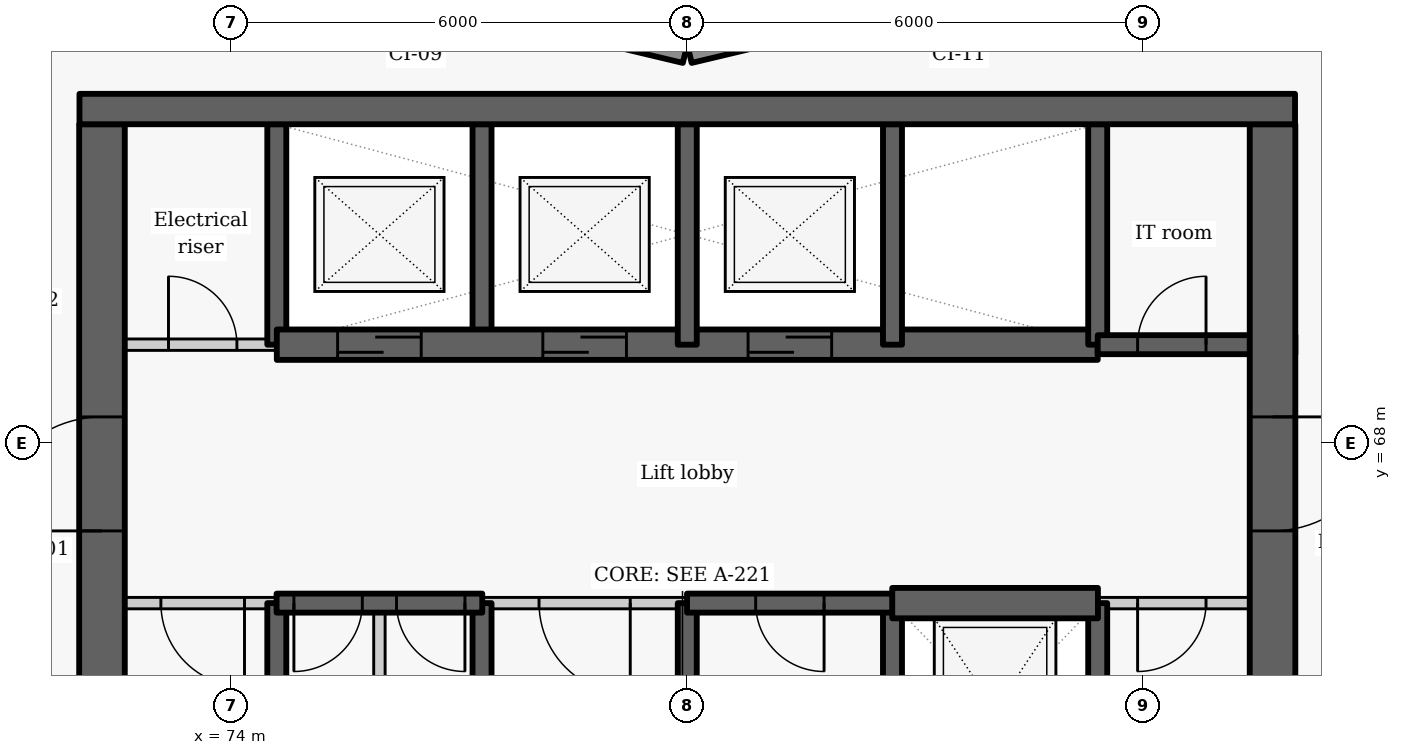
"""IFC4 building model, lengths in metres.
Left out: names, types, materials, properties, quantities, classifications, styles, units other than length and angle.
Written with IfcOpenShell. Run it as: python <this file> out.ifc"""

import sys

from ifc_helpers import new_model, si_unit, direction, frame, frame_2d, origin, place, context, subcontext, project, spatial, rectangle, extrude, element, fill, save


model = new_model("IFC4")
c1 = context("Model", 3, precision=1e-05, world=origin(), true_north=direction((0.0, 1.0)))
c2 = subcontext(c1, "Body", "Model", "MODEL_VIEW")
j1 = project(units=[si_unit("LENGTHUNIT", "METRE"), si_unit("PLANEANGLEUNIT", "RADIAN")], contexts=[c1])
p1 = place(None, origin())
s1 = spatial("IfcSite", under=j1, at=p1, CompositionType="ELEMENT")
p2 = place(p1, origin())
s2 = spatial("IfcBuilding", under=s1, at=p2, CompositionType="ELEMENT")
p3 = place(p2, frame((0.0, 0.0, 114.0)))
s3 = spatial("IfcBuildingStorey", under=s2, at=p3, CompositionType="ELEMENT", Elevation=114.0)
for number, where, z_axis, x_axis in (
    (1, (83.186, 73.881, 0.0), (0.0, 0.0, 1.0), (-0.973, -0.232, 0.0)),
    (2, (79.971, 73.128, 0.0), (0.0, 0.0, 1.0), (-0.973, 0.232, 0.0)),
):
    element("IfcWall", number, at=place(p3, frame(where, z_axis=z_axis, x_axis=x_axis)), inside=s3, PredefinedType="SOLIDWALL", context=c2, shape_type="SweptSolid", body=[
        extrude(rectangle(XDim=3.246, YDim=0.25, at=frame_2d((1.623, 0.0))), origin(), (0.0, 0.0, 1.0), 2.425),
    ])
p4 = place(p3, frame((74.6, 63.1, -0.275), z_axis=(0.0, 0.0, 1.0), x_axis=(0.0, 1.0, 0.0)))
e3 = element("IfcWall", 3, at=p4, inside=s3, PredefinedType="SHEAR", context=c2, shape_type="SweptSolid", body=[
    extrude(rectangle(XDim=2.8, YDim=0.25, at=frame_2d((1.4, 0.0))), origin(), (0.0, 0.0, 1.0), 3.3),
])
p5 = place(p3, frame((74.6, 69.3, -0.275), z_axis=(0.0, 0.0, 1.0), x_axis=(0.0, 1.0, 0.0)))
e4 = element("IfcWall", 4, at=p5, inside=s3, PredefinedType="SHEAR", context=c2, shape_type="SweptSolid", body=[
    extrude(rectangle(XDim=2.9, YDim=0.25, at=frame_2d((1.45, 0.0))), origin(), (0.0, 0.0, 1.0), 3.3),
])
p6 = place(p3, frame((72.0, 69.3, 0.0), z_axis=(0.0, 0.0, 1.0), x_axis=(1.0, 0.0, 0.0)))
e5 = element("IfcWall", 5, at=p6, inside=s3, PredefinedType="PARTITIONING", context=c2, shape_type="SweptSolid", body=[
    extrude(rectangle(XDim=2.6, YDim=0.15, at=frame_2d((1.3, 0.0))), origin(), (0.0, 0.0, 1.0), 3.025),
])
p7 = place(p6, frame((1.175, 0.0, 0.0)))
e6 = element("IfcOpeningElement", 6, at=p7, cuts=e5, PredefinedType="OPENING", context=c2, shape_type="SweptSolid", body=[
    extrude(rectangle(XDim=0.9, YDim=2.1, at=frame_2d((0.45, 1.05))), frame((0.0, 0.085, 0.0), z_axis=(0.0, -1.0, 0.0), x_axis=(1.0, 0.0, 0.0)), (0.0, 0.0, 1.0), 0.17),
])
p8 = place(p3, frame((72.3, 63.1, -0.275), z_axis=(0.0, 0.0, 1.0), x_axis=(0.0, 1.0, 0.0)))
e7 = element("IfcWall", 7, at=p8, inside=s3, PredefinedType="SHEAR", context=c2, shape_type="SweptSolid", body=[
    extrude(rectangle(XDim=9.1, YDim=0.6, at=frame_2d((4.55, 0.0))), origin(), (0.0, 0.0, 1.0), 3.3),
])
p9 = place(p8, frame((3.75, 0.0, 0.275)))
e8 = element("IfcOpeningElement", 8, at=p9, cuts=e7, PredefinedType="OPENING", context=c2, shape_type="SweptSolid", body=[
    extrude(rectangle(XDim=1.5, YDim=2.1, at=frame_2d((0.75, 1.05))), frame((0.0, 0.31, 0.0), z_axis=(0.0, -1.0, 0.0), x_axis=(1.0, 0.0, 0.0)), (0.0, 0.0, 1.0), 0.62),
])
p10 = place(p3, frame((77.3, 63.1, -0.275), z_axis=(0.0, 0.0, 1.0), x_axis=(0.0, 1.0, 0.0)))
e9 = element("IfcWall", 9, at=p10, inside=s3, PredefinedType="SHEAR", context=c2, shape_type="SweptSolid", body=[
    extrude(rectangle(XDim=2.8, YDim=0.25, at=frame_2d((1.4, 0.0))), origin(), (0.0, 0.0, 1.0), 3.3),
])
p11 = place(p3, frame((77.3, 69.3, -0.275), z_axis=(0.0, 0.0, 1.0), x_axis=(0.0, 1.0, 0.0)))
e10 = element("IfcWall", 10, at=p11, inside=s3, PredefinedType="SHEAR", context=c2, shape_type="SweptSolid", body=[
    extrude(rectangle(XDim=2.9, YDim=0.25, at=frame_2d((1.45, 0.0))), origin(), (0.0, 0.0, 1.0), 3.3),
])
p12 = place(p3, frame((74.6, 69.3, -0.275), z_axis=(0.0, 0.0, 1.0), x_axis=(1.0, 0.0, 0.0)))
e11 = element("IfcWall", 11, at=p12, inside=s3, PredefinedType="SHEAR", context=c2, shape_type="SweptSolid", body=[
    extrude(rectangle(XDim=10.8, YDim=0.4, at=frame_2d((5.4, 0.0))), origin(), (0.0, 0.0, 1.0), 3.3),
])
p13 = place(p12, frame((0.8, 0.0, 0.275)))
e12 = element("IfcOpeningElement", 12, at=p13, cuts=e11, PredefinedType="OPENING", context=c2, shape_type="SweptSolid", body=[
    extrude(rectangle(XDim=1.1, YDim=2.1, at=frame_2d((0.55, 1.05))), frame((0.0, 0.21, 0.0), z_axis=(0.0, -1.0, 0.0), x_axis=(1.0, 0.0, 0.0)), (0.0, 0.0, 1.0), 0.42),
])
p14 = place(p12, frame((3.5, 0.0, 0.275)))
e13 = element("IfcOpeningElement", 13, at=p14, cuts=e11, PredefinedType="OPENING", context=c2, shape_type="SweptSolid", body=[
    extrude(rectangle(XDim=1.1, YDim=2.1, at=frame_2d((0.55, 1.05))), frame((0.0, 0.21, 0.0), z_axis=(0.0, -1.0, 0.0), x_axis=(1.0, 0.0, 0.0)), (0.0, 0.0, 1.0), 0.42),
])
p15 = place(p12, frame((6.2, 0.0, 0.275)))
e14 = element("IfcOpeningElement", 14, at=p15, cuts=e11, PredefinedType="OPENING", context=c2, shape_type="SweptSolid", body=[
    extrude(rectangle(XDim=1.1, YDim=2.1, at=frame_2d((0.55, 1.05))), frame((0.0, 0.21, 0.0), z_axis=(0.0, -1.0, 0.0), x_axis=(1.0, 0.0, 0.0)), (0.0, 0.0, 1.0), 0.42),
])
p16 = place(p3, frame((80.0, 63.1, -0.275), z_axis=(0.0, 0.0, 1.0), x_axis=(0.0, 1.0, 0.0)))
e15 = element("IfcWall", 15, at=p16, inside=s3, PredefinedType="SHEAR", context=c2, shape_type="SweptSolid", body=[
    extrude(rectangle(XDim=2.8, YDim=0.25, at=frame_2d((1.4, 0.0))), origin(), (0.0, 0.0, 1.0), 3.3),
])
p17 = place(p3, frame((80.0, 69.3, -0.275), z_axis=(0.0, 0.0, 1.0), x_axis=(0.0, 1.0, 0.0)))
e16 = element("IfcWall", 16, at=p17, inside=s3, PredefinedType="SHEAR", context=c2, shape_type="SweptSolid", body=[
    extrude(rectangle(XDim=2.9, YDim=0.25, at=frame_2d((1.45, 0.0))), origin(), (0.0, 0.0, 1.0), 3.3),
])
p18 = place(p3, frame((82.7, 63.1, -0.275), z_axis=(0.0, 0.0, 1.0), x_axis=(0.0, 1.0, 0.0)))
e17 = element("IfcWall", 17, at=p18, inside=s3, PredefinedType="SHEAR", context=c2, shape_type="SweptSolid", body=[
    extrude(rectangle(XDim=2.8, YDim=0.25, at=frame_2d((1.4, 0.0))), origin(), (0.0, 0.0, 1.0), 3.3),
])
p19 = place(p3, frame((82.7, 69.3, -0.275), z_axis=(0.0, 0.0, 1.0), x_axis=(0.0, 1.0, 0.0)))
e18 = element("IfcWall", 18, at=p19, inside=s3, PredefinedType="SHEAR", context=c2, shape_type="SweptSolid", body=[
    extrude(rectangle(XDim=2.9, YDim=0.25, at=frame_2d((1.45, 0.0))), origin(), (0.0, 0.0, 1.0), 3.3),
])
p20 = place(p3, frame((85.4, 63.1, -0.275), z_axis=(0.0, 0.0, 1.0), x_axis=(0.0, 1.0, 0.0)))
e19 = element("IfcWall", 19, at=p20, inside=s3, PredefinedType="SHEAR", context=c2, shape_type="SweptSolid", body=[
    extrude(rectangle(XDim=2.8, YDim=0.25, at=frame_2d((1.4, 0.0))), origin(), (0.0, 0.0, 1.0), 3.3),
])
p21 = place(p3, frame((85.4, 69.3, -0.275), z_axis=(0.0, 0.0, 1.0), x_axis=(0.0, 1.0, 0.0)))
e20 = element("IfcWall", 20, at=p21, inside=s3, PredefinedType="SHEAR", context=c2, shape_type="SweptSolid", body=[
    extrude(rectangle(XDim=2.9, YDim=0.25, at=frame_2d((1.45, 0.0))), origin(), (0.0, 0.0, 1.0), 3.3),
])
p22 = place(p3, frame((85.4, 69.3, -0.275), z_axis=(0.0, 0.0, 1.0), x_axis=(1.0, 0.0, 0.0)))
e21 = element("IfcWall", 21, at=p22, inside=s3, PredefinedType="SHEAR", context=c2, shape_type="SweptSolid", body=[
    extrude(rectangle(XDim=2.6, YDim=0.25, at=frame_2d((1.3, 0.0))), origin(), (0.0, 0.0, 1.0), 3.3),
])
p23 = place(p22, frame((0.525, 0.0, 0.275)))
e22 = element("IfcOpeningElement", 22, at=p23, cuts=e21, PredefinedType="OPENING", context=c2, shape_type="SweptSolid", body=[
    extrude(rectangle(XDim=0.9, YDim=2.1, at=frame_2d((0.45, 1.05))), frame((0.0, 0.135, 0.0), z_axis=(0.0, -1.0, 0.0), x_axis=(1.0, 0.0, 0.0)), (0.0, 0.0, 1.0), 0.27),
])
p24 = place(p3, frame((87.7, 72.2, -0.275), z_axis=(0.0, 0.0, 1.0), x_axis=(0.0, -1.0, 0.0)))
e23 = element("IfcWall", 23, at=p24, inside=s3, PredefinedType="SHEAR", context=c2, shape_type="SweptSolid", body=[
    extrude(rectangle(XDim=15.6, YDim=0.6, at=frame_2d((7.8, 0.0))), origin(), (0.0, 0.0, 1.0), 3.3),
])
p25 = place(p24, frame((3.85, 0.0, 0.275)))
e24 = element("IfcOpeningElement", 24, at=p25, cuts=e23, PredefinedType="OPENING", context=c2, shape_type="SweptSolid", body=[
    extrude(rectangle(XDim=1.5, YDim=2.1, at=frame_2d((0.75, 1.05))), frame((0.0, 0.31, 0.0), z_axis=(0.0, -1.0, 0.0), x_axis=(1.0, 0.0, 0.0)), (0.0, 0.0, 1.0), 0.62),
])
p26 = place(p24, frame((11.8, 0.0, 0.275)))
e25 = element("IfcOpeningElement", 25, at=p26, cuts=e23, PredefinedType="OPENING", context=c2, shape_type="SweptSolid", body=[
    extrude(rectangle(XDim=1.1, YDim=2.1, at=frame_2d((0.55, 1.05))), frame((0.0, 0.31, 0.0), z_axis=(0.0, -1.0, 0.0), x_axis=(1.0, 0.0, 0.0)), (0.0, 0.0, 1.0), 0.62),
])
p27 = place(p3, frame((74.603, 65.9, 0.0), z_axis=(0.0, 0.0, 1.0), x_axis=(-1.0, 0.0, 0.0)))
e26 = element("IfcWall", 26, at=p27, inside=s3, PredefinedType="PARTITIONING", context=c2, shape_type="SweptSolid", body=[
    extrude(rectangle(XDim=2.603, YDim=0.15, at=frame_2d((1.302, 0.0))), origin(), (0.0, 0.0, 1.0), 3.025),
])
p28 = place(p27, frame((0.428, 0.0, 0.0)))
e27 = element("IfcOpeningElement", 27, at=p28, cuts=e26, PredefinedType="OPENING", context=c2, shape_type="SweptSolid", body=[
    extrude(rectangle(XDim=1.1, YDim=2.1, at=frame_2d((0.55, 1.05))), frame((0.0, 0.085, 0.0), z_axis=(0.0, -1.0, 0.0), x_axis=(1.0, 0.0, 0.0)), (0.0, 0.0, 1.0), 0.17),
])
p29 = place(p3, frame((80.003, 65.9, 0.0), z_axis=(0.0, 0.0, 1.0), x_axis=(-1.0, 0.0, 0.0)))
e28 = element("IfcWall", 28, at=p29, inside=s3, PredefinedType="PARTITIONING", context=c2, shape_type="SweptSolid", body=[
    extrude(rectangle(XDim=2.706, YDim=0.15, at=frame_2d((1.353, 0.0))), origin(), (0.0, 0.0, 1.0), 3.025),
])
p30 = place(p29, frame((0.753, 0.0, 0.0)))
e29 = element("IfcOpeningElement", 29, at=p30, cuts=e28, PredefinedType="OPENING", context=c2, shape_type="SweptSolid", body=[
    extrude(rectangle(XDim=1.2, YDim=2.1, at=frame_2d((0.6, 1.05))), frame((0.0, 0.085, 0.0), z_axis=(0.0, -1.0, 0.0), x_axis=(1.0, 0.0, 0.0)), (0.0, 0.0, 1.0), 0.17),
])
p31 = place(p3, frame((88.0, 65.9, 0.0), z_axis=(0.0, 0.0, 1.0), x_axis=(-1.0, 0.0, 0.0)))
e30 = element("IfcWall", 30, at=p31, inside=s3, PredefinedType="PARTITIONING", context=c2, shape_type="SweptSolid", body=[
    extrude(rectangle(XDim=2.603, YDim=0.15, at=frame_2d((1.302, 0.0))), origin(), (0.0, 0.0, 1.0), 3.025),
])
p32 = place(p31, frame((1.175, 0.0, 0.0)))
e31 = element("IfcOpeningElement", 31, at=p32, cuts=e30, PredefinedType="OPENING", context=c2, shape_type="SweptSolid", body=[
    extrude(rectangle(XDim=0.9, YDim=2.1, at=frame_2d((0.45, 1.05))), frame((0.0, 0.085, 0.0), z_axis=(0.0, -1.0, 0.0), x_axis=(1.0, 0.0, 0.0)), (0.0, 0.0, 1.0), 0.17),
])
p33 = place(p3, frame((77.303, 65.9, -0.275), z_axis=(0.0, 0.0, 1.0), x_axis=(-1.0, 0.0, 0.0)))
e32 = element("IfcWall", 32, at=p33, inside=s3, PredefinedType="SHEAR", context=c2, shape_type="SweptSolid", body=[
    extrude(rectangle(XDim=2.706, YDim=0.25, at=frame_2d((1.353, 0.0))), origin(), (0.0, 0.0, 1.0), 3.3),
])
p34 = place(p33, frame((1.578, 0.0, 0.275)))
e33 = element("IfcOpeningElement", 33, at=p34, cuts=e32, PredefinedType="OPENING", context=c2, shape_type="SweptSolid", body=[
    extrude(rectangle(XDim=0.9, YDim=2.1, at=frame_2d((0.45, 1.05))), frame((0.0, 0.135, 0.0), z_axis=(0.0, -1.0, 0.0), x_axis=(1.0, 0.0, 0.0)), (0.0, 0.0, 1.0), 0.27),
])
p35 = place(p33, frame((0.228, 0.0, 0.275)))
e34 = element("IfcOpeningElement", 34, at=p35, cuts=e32, PredefinedType="OPENING", context=c2, shape_type="SweptSolid", body=[
    extrude(rectangle(XDim=0.9, YDim=2.1, at=frame_2d((0.45, 1.05))), frame((0.0, 0.135, 0.0), z_axis=(0.0, -1.0, 0.0), x_axis=(1.0, 0.0, 0.0)), (0.0, 0.0, 1.0), 0.27),
])
p36 = place(p3, frame((82.703, 65.9, -0.275), z_axis=(0.0, 0.0, 1.0), x_axis=(-1.0, 0.0, 0.0)))
e35 = element("IfcWall", 35, at=p36, inside=s3, PredefinedType="SHEAR", context=c2, shape_type="SweptSolid", body=[
    extrude(rectangle(XDim=2.706, YDim=0.25, at=frame_2d((1.353, 0.0))), origin(), (0.0, 0.0, 1.0), 3.3),
])
p37 = place(p36, frame((0.903, 0.0, 0.275)))
e36 = element("IfcOpeningElement", 36, at=p37, cuts=e35, PredefinedType="OPENING", context=c2, shape_type="SweptSolid", body=[
    extrude(rectangle(XDim=0.9, YDim=2.1, at=frame_2d((0.45, 1.05))), frame((0.0, 0.135, 0.0), z_axis=(0.0, -1.0, 0.0), x_axis=(1.0, 0.0, 0.0)), (0.0, 0.0, 1.0), 0.27),
])
p38 = place(p3, frame((82.697, 65.9, -0.275), z_axis=(0.0, 0.0, 1.0), x_axis=(1.0, 0.0, 0.0)))
e37 = element("IfcWall", 37, at=p38, inside=s3, PredefinedType="SHEAR", context=c2, shape_type="SweptSolid", body=[
    extrude(rectangle(XDim=2.706, YDim=0.4, at=frame_2d((1.353, 0.0))), origin(), (0.0, 0.0, 1.0), 3.3),
])
p39 = place(p3, frame((75.95, 63.1, 0.0), z_axis=(0.0, 0.0, 1.0), x_axis=(0.0, 1.0, 0.0)))
e38 = element("IfcWall", 38, at=p39, inside=s3, PredefinedType="PARTITIONING", context=c2, shape_type="SweptSolid", body=[
    extrude(rectangle(XDim=2.8, YDim=0.15, at=frame_2d((1.4, 0.0))), origin(), (0.0, 0.0, 1.0), 3.025),
])
p40 = place(p3, frame((72.004, 72.4, -0.275), z_axis=(0.0, 0.0, 1.0), x_axis=(1.0, 0.0, 0.0)))
e39 = element("IfcWall", 39, at=p40, inside=s3, PredefinedType="SHEAR", context=c2, shape_type="SweptSolid", body=[
    extrude(rectangle(XDim=15.992, YDim=0.4, at=frame_2d((7.996, 0.0))), origin(), (0.0, 0.0, 1.0), 3.3),
])
p41 = place(p7, origin())
e40 = element("IfcDoor", 40, at=p41, inside=s3, OperationType="SINGLE_SWING_LEFT", PredefinedType="DOOR", context=c2, shape_type="SweptSolid", body=[
    extrude(rectangle(XDim=0.9, YDim=2.1, at=frame_2d((0.45, 1.05))), frame((0.0, 0.025, 0.0), z_axis=(0.0, -1.0, 0.0), x_axis=(1.0, 0.0, 0.0)), (0.0, 0.0, 1.0), 0.05),
])
fill(e6, e40)
p42 = place(p13, origin())
e41 = element("IfcDoor", 41, at=p42, inside=s3, OperationType="SLIDING_TO_LEFT", PredefinedType="DOOR", context=c2, shape_type="SweptSolid", body=[
    extrude(rectangle(XDim=1.1, YDim=2.1, at=frame_2d((0.55, 1.05))), frame((0.0, 0.025, 0.0), z_axis=(0.0, -1.0, 0.0), x_axis=(1.0, 0.0, 0.0)), (0.0, 0.0, 1.0), 0.05),
])
fill(e12, e41)
p43 = place(p14, origin())
e42 = element("IfcDoor", 42, at=p43, inside=s3, OperationType="SLIDING_TO_LEFT", PredefinedType="DOOR", context=c2, shape_type="SweptSolid", body=[
    extrude(rectangle(XDim=1.1, YDim=2.1, at=frame_2d((0.55, 1.05))), frame((0.0, 0.025, 0.0), z_axis=(0.0, -1.0, 0.0), x_axis=(1.0, 0.0, 0.0)), (0.0, 0.0, 1.0), 0.05),
])
fill(e13, e42)
p44 = place(p15, origin())
e43 = element("IfcDoor", 43, at=p44, inside=s3, OperationType="SLIDING_TO_LEFT", PredefinedType="DOOR", context=c2, shape_type="SweptSolid", body=[
    extrude(rectangle(XDim=1.1, YDim=2.1, at=frame_2d((0.55, 1.05))), frame((0.0, 0.025, 0.0), z_axis=(0.0, -1.0, 0.0), x_axis=(1.0, 0.0, 0.0)), (0.0, 0.0, 1.0), 0.05),
])
fill(e14, e43)
p45 = place(p23, origin())
e44 = element("IfcDoor", 44, at=p45, inside=s3, OperationType="SINGLE_SWING_RIGHT", PredefinedType="DOOR", context=c2, shape_type="SweptSolid", body=[
    extrude(rectangle(XDim=0.9, YDim=2.1, at=frame_2d((0.45, 1.05))), frame((0.0, 0.025, 0.0), z_axis=(0.0, -1.0, 0.0), x_axis=(1.0, 0.0, 0.0)), (0.0, 0.0, 1.0), 0.05),
])
fill(e22, e44)
p46 = place(p28, origin())
e45 = element("IfcDoor", 45, at=p46, inside=s3, OperationType="SINGLE_SWING_LEFT", PredefinedType="DOOR", context=c2, shape_type="SweptSolid", body=[
    extrude(rectangle(XDim=1.1, YDim=2.1, at=frame_2d((0.55, 1.05))), frame((0.0, 0.025, 0.0), z_axis=(0.0, -1.0, 0.0), x_axis=(1.0, 0.0, 0.0)), (0.0, 0.0, 1.0), 0.05),
])
fill(e27, e45)
p47 = place(p34, origin())
e46 = element("IfcDoor", 46, at=p47, inside=s3, OperationType="SINGLE_SWING_RIGHT", PredefinedType="DOOR", context=c2, shape_type="SweptSolid", body=[
    extrude(rectangle(XDim=0.9, YDim=2.1, at=frame_2d((0.45, 1.05))), frame((0.0, 0.025, 0.0), z_axis=(0.0, -1.0, 0.0), x_axis=(1.0, 0.0, 0.0)), (0.0, 0.0, 1.0), 0.05),
])
fill(e33, e46)
p48 = place(p35, origin())
e47 = element("IfcDoor", 47, at=p48, inside=s3, OperationType="SINGLE_SWING_LEFT", PredefinedType="DOOR", context=c2, shape_type="SweptSolid", body=[
    extrude(rectangle(XDim=0.9, YDim=2.1, at=frame_2d((0.45, 1.05))), frame((0.0, 0.025, 0.0), z_axis=(0.0, -1.0, 0.0), x_axis=(1.0, 0.0, 0.0)), (0.0, 0.0, 1.0), 0.05),
])
fill(e34, e47)
p49 = place(p30, origin())
e48 = element("IfcDoor", 48, at=p49, inside=s3, OperationType="DOUBLE_DOOR_SINGLE_SWING", PredefinedType="DOOR", context=c2, shape_type="SweptSolid", body=[
    extrude(rectangle(XDim=1.2, YDim=2.1, at=frame_2d((0.6, 1.05))), frame((0.0, 0.025, 0.0), z_axis=(0.0, -1.0, 0.0), x_axis=(1.0, 0.0, 0.0)), (0.0, 0.0, 1.0), 0.05),
])
fill(e29, e48)
p50 = place(p37, origin())
e49 = element("IfcDoor", 49, at=p50, inside=s3, OperationType="SINGLE_SWING_LEFT", PredefinedType="DOOR", context=c2, shape_type="SweptSolid", body=[
    extrude(rectangle(XDim=0.9, YDim=2.1, at=frame_2d((0.45, 1.05))), frame((0.0, 0.025, 0.0), z_axis=(0.0, -1.0, 0.0), x_axis=(1.0, 0.0, 0.0)), (0.0, 0.0, 1.0), 0.05),
])
fill(e36, e49)
p51 = place(p32, origin())
e50 = element("IfcDoor", 50, at=p51, inside=s3, OperationType="SINGLE_SWING_RIGHT", PredefinedType="DOOR", context=c2, shape_type="SweptSolid", body=[
    extrude(rectangle(XDim=0.9, YDim=2.1, at=frame_2d((0.45, 1.05))), frame((0.0, 0.025, 0.0), z_axis=(0.0, -1.0, 0.0), x_axis=(1.0, 0.0, 0.0)), (0.0, 0.0, 1.0), 0.05),
])
fill(e31, e50)
p52 = place(p25, origin())
e51 = element("IfcDoor", 51, at=p52, inside=s3, OperationType="DOUBLE_DOOR_SINGLE_SWING", PredefinedType="DOOR", context=c2, shape_type="SweptSolid", body=[
    extrude(rectangle(XDim=1.5, YDim=2.1, at=frame_2d((0.75, 1.05))), frame((0.0, 0.025, 0.0), z_axis=(0.0, -1.0, 0.0), x_axis=(1.0, 0.0, 0.0)), (0.0, 0.0, 1.0), 0.05),
])
fill(e24, e51)
p53 = place(p9, origin())
e52 = element("IfcDoor", 52, at=p53, inside=s3, OperationType="DOUBLE_DOOR_SINGLE_SWING", PredefinedType="DOOR", context=c2, shape_type="SweptSolid", body=[
    extrude(rectangle(XDim=1.5, YDim=2.1, at=frame_2d((0.75, 1.05))), frame((0.0, 0.025, 0.0), z_axis=(0.0, -1.0, 0.0), x_axis=(1.0, 0.0, 0.0)), (0.0, 0.0, 1.0), 0.05),
])
fill(e8, e52)
save(model, sys.argv[1])
